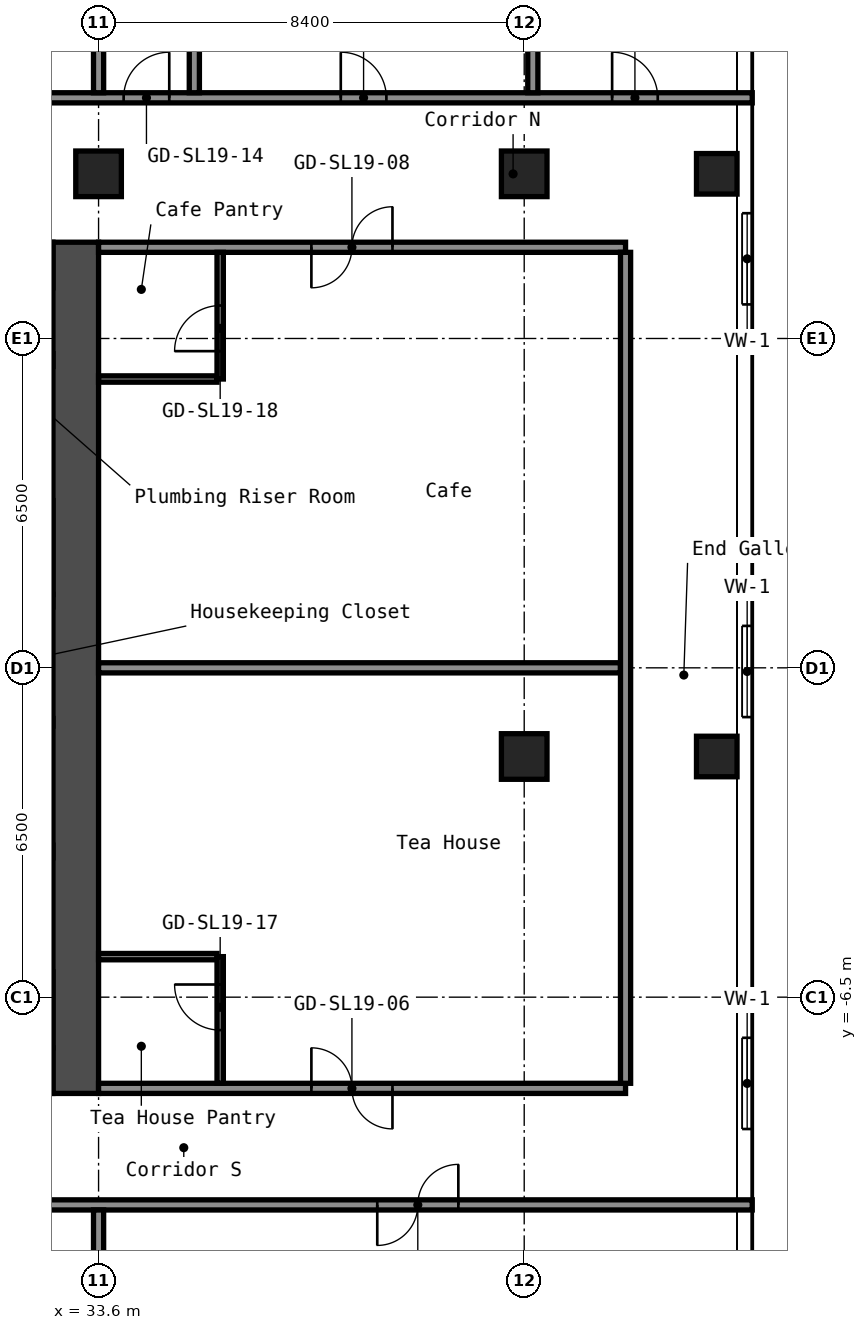
"""IFC4 building model, lengths in metres.
Left out: names, types, materials, properties, quantities, classifications, styles, units other than length and angle.
Written with IfcOpenShell. Run it as: python <this file> out.ifc"""

import sys

from ifc_helpers import new_model, si_unit, direction, frame, frame_2d, origin, origin_2d, place, context, subcontext, project, spatial, rectangle, hollow_rectangle, extrude, element, fill, save


model = new_model("IFC4")
c1 = context("Model", 3, precision=1e-05, world=origin(), true_north=direction((0.0, 1.0)))
c2 = subcontext(c1, "Body", "Model", "MODEL_VIEW")
j1 = project(units=[si_unit("LENGTHUNIT", "METRE"), si_unit("PLANEANGLEUNIT", "RADIAN")], contexts=[c1])
p1 = place(None, origin())
s1 = spatial("IfcSite", under=j1, at=p1, CompositionType="ELEMENT")
p2 = place(p1, origin())
s2 = spatial("IfcBuilding", under=s1, at=p2, CompositionType="ELEMENT")
p3 = place(p2, frame((0.0, 0.0, 69.0)))
s3 = spatial("IfcBuildingStorey", under=s2, at=p3, CompositionType="ELEMENT", Elevation=69.0)
for number, where, z_axis, x_axis in (
    (1, (33.6, 9.75, 0.0), (0.0, 0.0, 1.0), (1.0, 0.0, 0.0)),
    (2, (42.0, -1.75, 0.0), (0.0, 0.0, 1.0), (1.0, 0.0, 0.0)),
    (3, (42.0, 9.75, 0.0), (0.0, 0.0, 1.0), (1.0, 0.0, 0.0)),
):
    element("IfcColumn", number, at=place(p3, frame(where, z_axis=z_axis, x_axis=x_axis)), inside=s3, PredefinedType="COLUMN", context=c2, shape_type="SweptSolid", body=[
        extrude(hollow_rectangle(XDim=0.9, YDim=0.9, WallThickness=0.036, at=origin_2d()), origin(), (0.0, 0.0, 1.0), 6.0),
    ])
for number, where, z_axis, x_axis in (
    (4, (45.8, -1.75, 0.0), (0.0, 0.0, 1.0), (1.0, 0.0, 0.0)),
    (5, (45.8, 9.75, 0.0), (0.0, 0.0, 1.0), (1.0, 0.0, 0.0)),
):
    element("IfcColumn", number, at=place(p3, frame(where, z_axis=z_axis, x_axis=x_axis)), inside=s3, PredefinedType="COLUMN", context=c2, shape_type="SweptSolid", body=[
        extrude(hollow_rectangle(XDim=0.8, YDim=0.8, WallThickness=0.032, at=origin_2d()), origin(), (0.0, 0.0, 1.0), 6.0),
    ])
p4 = place(p3, frame((33.15, -8.4, 0.0), z_axis=(0.0, 0.0, 1.0), x_axis=(0.0, 1.0, 0.0)))
e6 = element("IfcWall", 6, at=p4, inside=s3, PredefinedType="SHEAR", context=c2, shape_type="SweptSolid", body=[
    extrude(rectangle(XDim=16.8, YDim=0.9, at=frame_2d((8.4, 0.0))), origin(), (0.0, 0.0, 1.0), 6.0),
])
p5 = place(p3, frame((16.8, -10.6, 0.0), z_axis=(0.0, 0.0, 1.0), x_axis=(1.0, 0.0, 0.0)))
e7 = element("IfcWall", 7, at=p5, inside=s3, PredefinedType="PARTITIONING", context=c2, shape_type="SweptSolid", body=[
    extrude(rectangle(XDim=29.7, YDim=0.2, at=frame_2d((14.85, 0.0))), origin(), (0.0, 0.0, 1.0), 6.0),
])
p6 = place(p5, frame((9.7, 0.0, 0.0)))
e8 = element("IfcOpeningElement", 8, at=p6, cuts=e7, PredefinedType="OPENING", context=c2, shape_type="SweptSolid", body=[
    extrude(rectangle(XDim=1.6, YDim=2.1, at=frame_2d((0.8, 1.05))), frame((0.0, 0.11, 0.0), z_axis=(0.0, -1.0, 0.0), x_axis=(1.0, 0.0, 0.0)), (0.0, 0.0, 1.0), 0.22),
])
p7 = place(p5, frame((22.3, 0.0, 0.0)))
e9 = element("IfcOpeningElement", 9, at=p7, cuts=e7, PredefinedType="OPENING", context=c2, shape_type="SweptSolid", body=[
    extrude(rectangle(XDim=1.6, YDim=2.1, at=frame_2d((0.8, 1.05))), frame((0.0, 0.11, 0.0), z_axis=(0.0, -1.0, 0.0), x_axis=(1.0, 0.0, 0.0)), (0.0, 0.0, 1.0), 0.22),
])
p8 = place(p3, frame((33.6, -8.3, 0.0), z_axis=(0.0, 0.0, 1.0), x_axis=(1.0, 0.0, 0.0)))
e10 = element("IfcWall", 10, at=p8, inside=s3, PredefinedType="PARTITIONING", context=c2, shape_type="SweptSolid", body=[
    extrude(rectangle(XDim=10.4, YDim=0.2, at=frame_2d((5.2, 0.0))), origin(), (0.0, 0.0, 1.0), 6.0),
])
p9 = place(p8, frame((4.2, 0.0, 0.0)))
e11 = element("IfcOpeningElement", 11, at=p9, cuts=e10, PredefinedType="OPENING", context=c2, shape_type="SweptSolid", body=[
    extrude(rectangle(XDim=1.6, YDim=2.1, at=frame_2d((0.8, 1.05))), frame((0.0, 0.11, 0.0), z_axis=(0.0, -1.0, 0.0), x_axis=(1.0, 0.0, 0.0)), (0.0, 0.0, 1.0), 0.22),
])
p10 = place(p3, frame((33.6, -5.7, 0.0), z_axis=(0.0, 0.0, 1.0), x_axis=(1.0, 0.0, 0.0)))
e12 = element("IfcWall", 12, at=p10, inside=s3, PredefinedType="PARTITIONING", context=c2, shape_type="SweptSolid", body=[
    extrude(rectangle(XDim=2.337, YDim=0.125, at=frame_2d((1.169, 0.0))), origin(), (0.0, 0.0, 1.0), 6.0),
])
p11 = place(p3, frame((33.6, 0.0, 0.0), z_axis=(0.0, 0.0, 1.0), x_axis=(1.0, 0.0, 0.0)))
e13 = element("IfcWall", 13, at=p11, inside=s3, PredefinedType="PARTITIONING", context=c2, shape_type="SweptSolid", body=[
    extrude(rectangle(XDim=10.3, YDim=0.2, at=frame_2d((5.15, 0.0))), origin(), (0.0, 0.0, 1.0), 6.0),
])
p12 = place(p3, frame((33.6, 5.7, 0.0), z_axis=(0.0, 0.0, 1.0), x_axis=(1.0, 0.0, 0.0)))
e14 = element("IfcWall", 14, at=p12, inside=s3, PredefinedType="PARTITIONING", context=c2, shape_type="SweptSolid", body=[
    extrude(rectangle(XDim=2.337, YDim=0.125, at=frame_2d((1.169, 0.0))), origin(), (0.0, 0.0, 1.0), 6.0),
])
p13 = place(p3, frame((33.6, 8.3, 0.0), z_axis=(0.0, 0.0, 1.0), x_axis=(1.0, 0.0, 0.0)))
e15 = element("IfcWall", 15, at=p13, inside=s3, PredefinedType="PARTITIONING", context=c2, shape_type="SweptSolid", body=[
    extrude(rectangle(XDim=10.4, YDim=0.2, at=frame_2d((5.2, 0.0))), origin(), (0.0, 0.0, 1.0), 6.0),
])
p14 = place(p13, frame((4.2, 0.0, 0.0)))
e16 = element("IfcOpeningElement", 16, at=p14, cuts=e15, PredefinedType="OPENING", context=c2, shape_type="SweptSolid", body=[
    extrude(rectangle(XDim=1.6, YDim=2.1, at=frame_2d((0.8, 1.05))), frame((0.0, 0.11, 0.0), z_axis=(0.0, -1.0, 0.0), x_axis=(1.0, 0.0, 0.0)), (0.0, 0.0, 1.0), 0.22),
])
p15 = place(p3, frame((16.8, 11.25, 0.0), z_axis=(0.0, 0.0, 1.0), x_axis=(1.0, 0.0, 0.0)))
e17 = element("IfcWall", 17, at=p15, inside=s3, PredefinedType="PARTITIONING", context=c2, shape_type="SweptSolid", body=[
    extrude(rectangle(XDim=29.7, YDim=0.2, at=frame_2d((14.85, 0.0))), origin(), (0.0, 0.0, 1.0), 6.0),
])
p16 = place(p15, frame((9.7, 0.0, 0.0)))
e18 = element("IfcOpeningElement", 18, at=p16, cuts=e17, PredefinedType="OPENING", context=c2, shape_type="SweptSolid", body=[
    extrude(rectangle(XDim=1.6, YDim=2.1, at=frame_2d((0.8, 1.05))), frame((0.0, 0.11, 0.0), z_axis=(0.0, -1.0, 0.0), x_axis=(1.0, 0.0, 0.0)), (0.0, 0.0, 1.0), 0.22),
])
p17 = place(p15, frame((17.295, 0.0, 0.0)))
e19 = element("IfcOpeningElement", 19, at=p17, cuts=e17, PredefinedType="OPENING", context=c2, shape_type="SweptSolid", body=[
    extrude(rectangle(XDim=0.9, YDim=2.1, at=frame_2d((0.45, 1.05))), frame((0.0, 0.11, 0.0), z_axis=(0.0, -1.0, 0.0), x_axis=(1.0, 0.0, 0.0)), (0.0, 0.0, 1.0), 0.22),
])
p18 = place(p15, frame((21.58, 0.0, 0.0)))
e20 = element("IfcOpeningElement", 20, at=p18, cuts=e17, PredefinedType="OPENING", context=c2, shape_type="SweptSolid", body=[
    extrude(rectangle(XDim=0.9, YDim=2.1, at=frame_2d((0.45, 1.05))), frame((0.0, 0.11, 0.0), z_axis=(0.0, -1.0, 0.0), x_axis=(1.0, 0.0, 0.0)), (0.0, 0.0, 1.0), 0.22),
])
p19 = place(p15, frame((26.935, 0.0, 0.0)))
e21 = element("IfcOpeningElement", 21, at=p19, cuts=e17, PredefinedType="OPENING", context=c2, shape_type="SweptSolid", body=[
    extrude(rectangle(XDim=0.9, YDim=2.1, at=frame_2d((0.45, 1.05))), frame((0.0, 0.11, 0.0), z_axis=(0.0, -1.0, 0.0), x_axis=(1.0, 0.0, 0.0)), (0.0, 0.0, 1.0), 0.22),
])
p20 = place(p3, frame((33.6, -15.55, 0.0), z_axis=(0.0, 0.0, 1.0), x_axis=(0.0, 1.0, 0.0)))
e22 = element("IfcWall", 22, at=p20, inside=s3, PredefinedType="PARTITIONING", context=c2, shape_type="SweptSolid", body=[
    extrude(rectangle(XDim=4.85, YDim=0.2, at=frame_2d((2.425, 0.0))), origin(), (0.0, 0.0, 1.0), 6.0),
])
for number, where, z_axis, x_axis in (
    (23, (33.6, 11.35, 0.0), (0.0, 0.0, 1.0), (0.0, 1.0, 0.0)),
    (24, (35.49, 11.35, 0.0), (0.0, 0.0, 1.0), (0.0, 1.0, 0.0)),
):
    element("IfcWall", number, at=place(p3, frame(where, z_axis=z_axis, x_axis=x_axis)), inside=s3, PredefinedType="PARTITIONING", context=c2, shape_type="SweptSolid", body=[
        extrude(rectangle(XDim=12.2, YDim=0.2, at=frame_2d((6.1, 0.0))), origin(), (0.0, 0.0, 1.0), 6.0),
    ])
p21 = place(p3, frame((36.0, -8.2, 0.0), z_axis=(0.0, 0.0, 1.0), x_axis=(0.0, 1.0, 0.0)))
e25 = element("IfcWall", 25, at=p21, inside=s3, PredefinedType="PARTITIONING", context=c2, shape_type="SweptSolid", body=[
    extrude(rectangle(XDim=2.5, YDim=0.125, at=frame_2d((1.25, 0.0))), origin(), (0.0, 0.0, 1.0), 6.0),
])
p22 = place(p21, frame((1.05, 0.0, 0.0)))
e26 = element("IfcOpeningElement", 26, at=p22, cuts=e25, PredefinedType="OPENING", context=c2, shape_type="SweptSolid", body=[
    extrude(rectangle(XDim=0.9, YDim=2.1, at=frame_2d((0.45, 1.05))), frame((0.0, 0.073, 0.0), z_axis=(0.0, -1.0, 0.0), x_axis=(1.0, 0.0, 0.0)), (0.0, 0.0, 1.0), 0.145),
])
p23 = place(p3, frame((36.0, 5.7, 0.0), z_axis=(0.0, 0.0, 1.0), x_axis=(0.0, 1.0, 0.0)))
e27 = element("IfcWall", 27, at=p23, inside=s3, PredefinedType="PARTITIONING", context=c2, shape_type="SweptSolid", body=[
    extrude(rectangle(XDim=2.5, YDim=0.125, at=frame_2d((1.25, 0.0))), origin(), (0.0, 0.0, 1.0), 6.0),
])
p24 = place(p23, frame((0.55, 0.0, 0.0)))
e28 = element("IfcOpeningElement", 28, at=p24, cuts=e27, PredefinedType="OPENING", context=c2, shape_type="SweptSolid", body=[
    extrude(rectangle(XDim=0.9, YDim=2.1, at=frame_2d((0.45, 1.05))), frame((0.0, 0.073, 0.0), z_axis=(0.0, -1.0, 0.0), x_axis=(1.0, 0.0, 0.0)), (0.0, 0.0, 1.0), 0.145),
])
p25 = place(p3, frame((42.17, 11.35, 0.0), z_axis=(0.0, 0.0, 1.0), x_axis=(0.0, 1.0, 0.0)))
e29 = element("IfcWall", 29, at=p25, inside=s3, PredefinedType="PARTITIONING", context=c2, shape_type="SweptSolid", body=[
    extrude(rectangle(XDim=12.2, YDim=0.2, at=frame_2d((6.1, 0.0))), origin(), (0.0, 0.0, 1.0), 6.0),
])
p26 = place(p3, frame((44.0, -8.2, 0.0), z_axis=(0.0, 0.0, 1.0), x_axis=(0.0, 1.0, 0.0)))
e30 = element("IfcWall", 30, at=p26, inside=s3, PredefinedType="PARTITIONING", context=c2, shape_type="SweptSolid", body=[
    extrude(rectangle(XDim=16.4, YDim=0.2, at=frame_2d((8.2, 0.0))), origin(), (0.0, 0.0, 1.0), 6.0),
])
p27 = place(p3, frame((46.4, -12.26, 4.45), z_axis=(0.0, 0.0, 1.0), x_axis=(0.0, 1.0, 0.0)))
p28 = place(p27, frame((3.157, 0.0, 0.25)))
p29 = place(p28, origin())
e31 = element("IfcWindow", 31, at=p29, inside=s3, PartitioningType="SINGLE_PANEL", PredefinedType="WINDOW", context=c2, shape_type="SweptSolid", body=[
    extrude(rectangle(XDim=1.8, YDim=0.9, at=frame_2d((0.9, 0.45))), frame((0.0, 0.03, 0.0), z_axis=(0.0, -1.0, 0.0), x_axis=(1.0, 0.0, 0.0)), (0.0, 0.0, 1.0), 0.06),
])
p30 = place(p3, frame((46.4, -4.145, 4.45), z_axis=(0.0, 0.0, 1.0), x_axis=(0.0, 1.0, 0.0)))
p31 = place(p30, frame((3.172, 0.0, 0.25)))
p32 = place(p31, origin())
e32 = element("IfcWindow", 32, at=p32, inside=s3, PartitioningType="SINGLE_PANEL", PredefinedType="WINDOW", context=c2, shape_type="SweptSolid", body=[
    extrude(rectangle(XDim=1.8, YDim=0.9, at=frame_2d((0.9, 0.45))), frame((0.0, 0.03, 0.0), z_axis=(0.0, -1.0, 0.0), x_axis=(1.0, 0.0, 0.0)), (0.0, 0.0, 1.0), 0.06),
])
p33 = place(p3, frame((46.4, 4.0, 4.45), z_axis=(0.0, 0.0, 1.0), x_axis=(0.0, 1.0, 0.0)))
p34 = place(p33, frame((3.172, 0.0, 0.25)))
p35 = place(p34, origin())
e33 = element("IfcWindow", 33, at=p35, inside=s3, PartitioningType="SINGLE_PANEL", PredefinedType="WINDOW", context=c2, shape_type="SweptSolid", body=[
    extrude(rectangle(XDim=1.8, YDim=0.9, at=frame_2d((0.9, 0.45))), frame((0.0, 0.03, 0.0), z_axis=(0.0, -1.0, 0.0), x_axis=(1.0, 0.0, 0.0)), (0.0, 0.0, 1.0), 0.06),
])
p36 = place(p7, origin())
e34 = element("IfcDoor", 34, at=p36, inside=s3, OperationType="DOUBLE_DOOR_SINGLE_SWING", PredefinedType="DOOR", context=c2, shape_type="SweptSolid", body=[
    extrude(rectangle(XDim=1.6, YDim=2.1, at=frame_2d((0.8, 1.05))), frame((0.0, 0.025, 0.0), z_axis=(0.0, -1.0, 0.0), x_axis=(1.0, 0.0, 0.0)), (0.0, 0.0, 1.0), 0.05),
])
fill(e9, e34)
p37 = place(p9, origin())
e35 = element("IfcDoor", 35, at=p37, inside=s3, OperationType="DOUBLE_DOOR_SINGLE_SWING", PredefinedType="DOOR", context=c2, shape_type="SweptSolid", body=[
    extrude(rectangle(XDim=1.6, YDim=2.1, at=frame_2d((0.8, 1.05))), frame((0.0, 0.025, 0.0), z_axis=(0.0, -1.0, 0.0), x_axis=(1.0, 0.0, 0.0)), (0.0, 0.0, 1.0), 0.05),
])
fill(e11, e35)
p38 = place(p14, origin())
e36 = element("IfcDoor", 36, at=p38, inside=s3, OperationType="DOUBLE_DOOR_SINGLE_SWING", PredefinedType="DOOR", context=c2, shape_type="SweptSolid", body=[
    extrude(rectangle(XDim=1.6, YDim=2.1, at=frame_2d((0.8, 1.05))), frame((0.0, 0.025, 0.0), z_axis=(0.0, -1.0, 0.0), x_axis=(1.0, 0.0, 0.0)), (0.0, 0.0, 1.0), 0.05),
])
fill(e16, e36)
p39 = place(p17, origin())
e37 = element("IfcDoor", 37, at=p39, inside=s3, OperationType="SINGLE_SWING_LEFT", PredefinedType="DOOR", context=c2, shape_type="SweptSolid", body=[
    extrude(rectangle(XDim=0.9, YDim=2.1, at=frame_2d((0.45, 1.05))), frame((0.0, 0.025, 0.0), z_axis=(0.0, -1.0, 0.0), x_axis=(1.0, 0.0, 0.0)), (0.0, 0.0, 1.0), 0.05),
])
fill(e19, e37)
p40 = place(p18, origin())
e38 = element("IfcDoor", 38, at=p40, inside=s3, OperationType="SINGLE_SWING_RIGHT", PredefinedType="DOOR", context=c2, shape_type="SweptSolid", body=[
    extrude(rectangle(XDim=0.9, YDim=2.1, at=frame_2d((0.45, 1.05))), frame((0.0, 0.025, 0.0), z_axis=(0.0, -1.0, 0.0), x_axis=(1.0, 0.0, 0.0)), (0.0, 0.0, 1.0), 0.05),
])
fill(e20, e38)
p41 = place(p19, origin())
e39 = element("IfcDoor", 39, at=p41, inside=s3, OperationType="SINGLE_SWING_RIGHT", PredefinedType="DOOR", context=c2, shape_type="SweptSolid", body=[
    extrude(rectangle(XDim=0.9, YDim=2.1, at=frame_2d((0.45, 1.05))), frame((0.0, 0.025, 0.0), z_axis=(0.0, -1.0, 0.0), x_axis=(1.0, 0.0, 0.0)), (0.0, 0.0, 1.0), 0.05),
])
fill(e21, e39)
p42 = place(p22, origin())
e40 = element("IfcDoor", 40, at=p42, inside=s3, OperationType="SINGLE_SWING_LEFT", PredefinedType="DOOR", context=c2, shape_type="SweptSolid", body=[
    extrude(rectangle(XDim=0.9, YDim=2.1, at=frame_2d((0.45, 1.05))), frame((0.0, 0.025, 0.0), z_axis=(0.0, -1.0, 0.0), x_axis=(1.0, 0.0, 0.0)), (0.0, 0.0, 1.0), 0.05),
])
fill(e26, e40)
p43 = place(p24, origin())
e41 = element("IfcDoor", 41, at=p43, inside=s3, OperationType="SINGLE_SWING_RIGHT", PredefinedType="DOOR", context=c2, shape_type="SweptSolid", body=[
    extrude(rectangle(XDim=0.9, YDim=2.1, at=frame_2d((0.45, 1.05))), frame((0.0, 0.025, 0.0), z_axis=(0.0, -1.0, 0.0), x_axis=(1.0, 0.0, 0.0)), (0.0, 0.0, 1.0), 0.05),
])
fill(e28, e41)
save(model, sys.argv[1])
